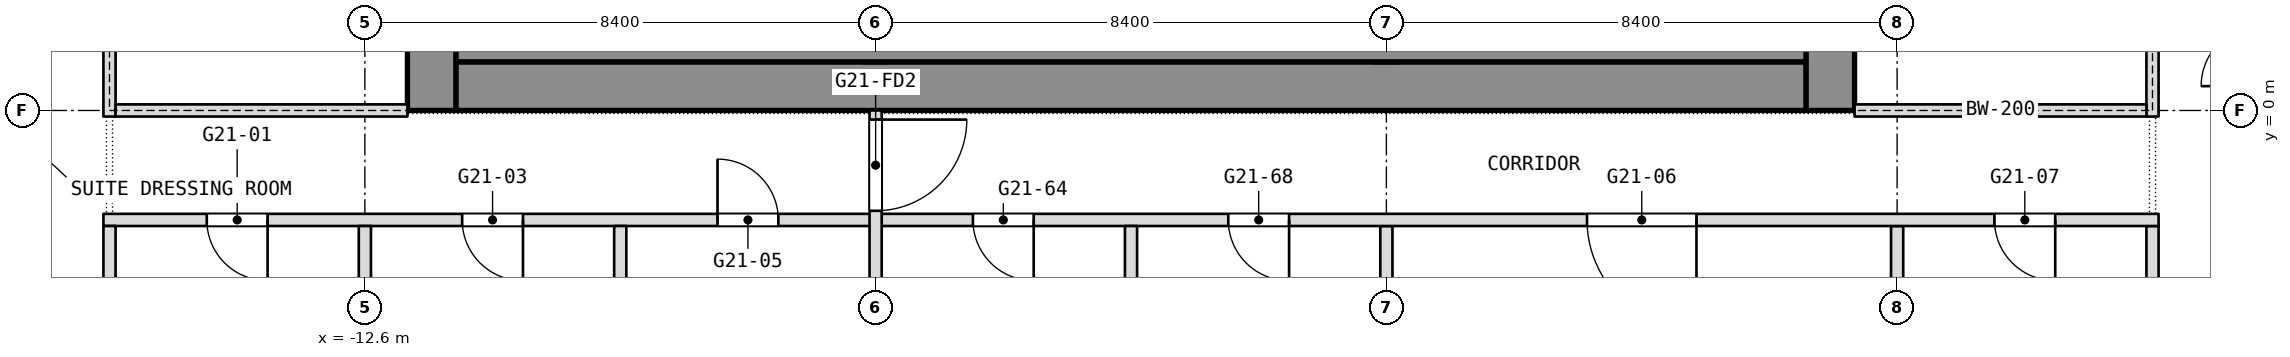
"""IFC4 building model, lengths in metres.
Left out: names, types, materials, properties, quantities, classifications, styles, units other than length and angle.
Written with IfcOpenShell. Run it as: python <this file> out.ifc"""

import sys

from ifc_helpers import new_model, si_unit, direction, frame, frame_2d, origin, place, context, subcontext, project, spatial, rectangle, extrude, element, fill, save


model = new_model("IFC4")
c1 = context("Model", 3, precision=1e-05, world=origin(), true_north=direction((0.0, 1.0)))
c2 = subcontext(c1, "Body", "Model", "MODEL_VIEW")
j1 = project(units=[si_unit("LENGTHUNIT", "METRE"), si_unit("PLANEANGLEUNIT", "RADIAN")], contexts=[c1])
p1 = place(None, origin())
s1 = spatial("IfcSite", under=j1, at=p1, CompositionType="ELEMENT")
p2 = place(p1, origin())
s2 = spatial("IfcBuilding", under=s1, at=p2, CompositionType="ELEMENT")
p3 = place(p2, frame((0.0, 0.0, 248.9)))
s3 = spatial("IfcBuildingStorey", under=s2, at=p3, CompositionType="ELEMENT", Elevation=248.9)
p4 = place(p3, frame((11.5, 0.0, 0.0), z_axis=(0.0, 0.0, 1.0), x_axis=(0.0, 1.0, 0.0)))
e1 = element("IfcWall", 1, at=p4, inside=s3, PredefinedType="SHEAR", context=c2, shape_type="SweptSolid", body=[
    extrude(rectangle(XDim=16.8, YDim=0.8, at=frame_2d((8.4, 0.0))), origin(), (0.0, 0.0, 1.0), 3.6),
])
p5 = place(p4, frame((2.3, 0.0, 0.0)))
e2 = element("IfcOpeningElement", 2, at=p5, cuts=e1, PredefinedType="OPENING", context=c2, shape_type="SweptSolid", body=[
    extrude(rectangle(XDim=1.1, YDim=2.1, at=frame_2d((0.55, 1.05))), frame((0.0, 0.4, 0.0), z_axis=(0.0, -1.0, 0.0), x_axis=(1.0, 0.0, 0.0)), (0.0, 0.0, 1.0), 0.8),
])
p6 = place(p4, frame((4.85, 0.0, 0.0)))
e3 = element("IfcOpeningElement", 3, at=p6, cuts=e1, PredefinedType="OPENING", context=c2, shape_type="SweptSolid", body=[
    extrude(rectangle(XDim=1.1, YDim=2.1, at=frame_2d((0.55, 1.05))), frame((0.0, 0.4, 0.0), z_axis=(0.0, -1.0, 0.0), x_axis=(1.0, 0.0, 0.0)), (0.0, 0.0, 1.0), 0.8),
])
p7 = place(p4, frame((6.825, 0.0, 0.0)))
e4 = element("IfcOpeningElement", 4, at=p7, cuts=e1, PredefinedType="OPENING", context=c2, shape_type="SweptSolid", body=[
    extrude(rectangle(XDim=1.2, YDim=2.1, at=frame_2d((0.6, 1.05))), frame((0.0, 0.4, 0.0), z_axis=(0.0, -1.0, 0.0), x_axis=(1.0, 0.0, 0.0)), (0.0, 0.0, 1.0), 0.8),
])
p8 = place(p4, frame((13.4, 0.0, 0.0)))
e5 = element("IfcOpeningElement", 5, at=p8, cuts=e1, PredefinedType="OPENING", context=c2, shape_type="SweptSolid", body=[
    extrude(rectangle(XDim=1.1, YDim=2.1, at=frame_2d((0.55, 1.05))), frame((0.0, 0.4, 0.0), z_axis=(0.0, -1.0, 0.0), x_axis=(1.0, 0.0, 0.0)), (0.0, 0.0, 1.0), 0.8),
])
p9 = place(p4, frame((10.85, 0.0, 0.0)))
e6 = element("IfcOpeningElement", 6, at=p9, cuts=e1, PredefinedType="OPENING", context=c2, shape_type="SweptSolid", body=[
    extrude(rectangle(XDim=1.1, YDim=2.1, at=frame_2d((0.55, 1.05))), frame((0.0, 0.4, 0.0), z_axis=(0.0, -1.0, 0.0), x_axis=(1.0, 0.0, 0.0)), (0.0, 0.0, 1.0), 0.8),
])
p10 = place(p4, frame((8.775, 0.0, 0.0)))
e7 = element("IfcOpeningElement", 7, at=p10, cuts=e1, PredefinedType="OPENING", context=c2, shape_type="SweptSolid", body=[
    extrude(rectangle(XDim=1.2, YDim=2.1, at=frame_2d((0.6, 1.05))), frame((0.0, 0.4, 0.0), z_axis=(0.0, -1.0, 0.0), x_axis=(1.0, 0.0, 0.0)), (0.0, 0.0, 1.0), 0.8),
])
p11 = place(p3, frame((-11.5, 0.0, 0.0), z_axis=(0.0, 0.0, 1.0), x_axis=(0.0, 1.0, 0.0)))
e8 = element("IfcWall", 8, at=p11, inside=s3, PredefinedType="SHEAR", context=c2, shape_type="SweptSolid", body=[
    extrude(rectangle(XDim=16.8, YDim=0.8, at=frame_2d((8.4, 0.0))), origin(), (0.0, 0.0, 1.0), 3.6),
])
p12 = place(p11, frame((3.6, 0.0, 0.0)))
e9 = element("IfcOpeningElement", 9, at=p12, cuts=e8, PredefinedType="OPENING", context=c2, shape_type="SweptSolid", body=[
    extrude(rectangle(XDim=0.9, YDim=2.1, at=frame_2d((0.45, 1.05))), frame((0.0, 0.4, 0.0), z_axis=(0.0, -1.0, 0.0), x_axis=(1.0, 0.0, 0.0)), (0.0, 0.0, 1.0), 0.8),
])
p13 = place(p11, frame((6.825, 0.0, 0.0)))
e10 = element("IfcOpeningElement", 10, at=p13, cuts=e8, PredefinedType="OPENING", context=c2, shape_type="SweptSolid", body=[
    extrude(rectangle(XDim=1.2, YDim=2.1, at=frame_2d((0.6, 1.05))), frame((0.0, 0.4, 0.0), z_axis=(0.0, -1.0, 0.0), x_axis=(1.0, 0.0, 0.0)), (0.0, 0.0, 1.0), 0.8),
])
p14 = place(p11, frame((14.062, 0.0, 0.0)))
e11 = element("IfcOpeningElement", 11, at=p14, cuts=e8, PredefinedType="OPENING", context=c2, shape_type="SweptSolid", body=[
    extrude(rectangle(XDim=0.9, YDim=2.1, at=frame_2d((0.45, 1.05))), frame((0.0, 0.4, 0.0), z_axis=(0.0, -1.0, 0.0), x_axis=(1.0, 0.0, 0.0)), (0.0, 0.0, 1.0), 0.8),
])
p15 = place(p11, frame((11.438, 0.0, 0.0)))
e12 = element("IfcOpeningElement", 12, at=p15, cuts=e8, PredefinedType="OPENING", context=c2, shape_type="SweptSolid", body=[
    extrude(rectangle(XDim=0.9, YDim=2.1, at=frame_2d((0.45, 1.05))), frame((0.0, 0.4, 0.0), z_axis=(0.0, -1.0, 0.0), x_axis=(1.0, 0.0, 0.0)), (0.0, 0.0, 1.0), 0.8),
])
p16 = place(p11, frame((8.775, 0.0, 0.0)))
e13 = element("IfcOpeningElement", 13, at=p16, cuts=e8, PredefinedType="OPENING", context=c2, shape_type="SweptSolid", body=[
    extrude(rectangle(XDim=1.2, YDim=2.1, at=frame_2d((0.6, 1.05))), frame((0.0, 0.4, 0.0), z_axis=(0.0, -1.0, 0.0), x_axis=(1.0, 0.0, 0.0)), (0.0, 0.0, 1.0), 0.8),
])
p17 = place(p3, frame((-11.1, 0.4, 0.0), z_axis=(0.0, 0.0, 1.0), x_axis=(1.0, 0.0, 0.0)))
e14 = element("IfcWall", 14, at=p17, inside=s3, PredefinedType="SHEAR", context=c2, shape_type="SweptSolid", body=[
    extrude(rectangle(XDim=22.2, YDim=0.8, at=frame_2d((11.1, 0.0))), origin(), (0.0, 0.0, 1.0), 3.6),
])
p18 = place(p3, frame((-4.2, 0.8, 0.0), z_axis=(0.0, 0.0, 1.0), x_axis=(0.0, 1.0, 0.0)))
e15 = element("IfcWall", 15, at=p18, inside=s3, PredefinedType="SHEAR", context=c2, shape_type="SweptSolid", body=[
    extrude(rectangle(XDim=15.2, YDim=0.4, at=frame_2d((7.6, 0.0))), origin(), (0.0, 0.0, 1.0), 3.6),
])
p19 = place(p18, frame((8.5, 0.0, 0.0)))
e16 = element("IfcOpeningElement", 16, at=p19, cuts=e15, PredefinedType="OPENING", context=c2, shape_type="SweptSolid", body=[
    extrude(rectangle(XDim=1.2, YDim=2.1, at=frame_2d((0.6, 1.05))), frame((0.0, 0.2, 0.0), z_axis=(0.0, -1.0, 0.0), x_axis=(1.0, 0.0, 0.0)), (0.0, 0.0, 1.0), 0.4),
])
p20 = place(p3, frame((4.2, 0.8, 0.0), z_axis=(0.0, 0.0, 1.0), x_axis=(0.0, 1.0, 0.0)))
e17 = element("IfcWall", 17, at=p20, inside=s3, PredefinedType="SHEAR", context=c2, shape_type="SweptSolid", body=[
    extrude(rectangle(XDim=15.2, YDim=0.4, at=frame_2d((7.6, 0.0))), origin(), (0.0, 0.0, 1.0), 3.6),
])
p21 = place(p20, frame((5.95, 0.0, 0.0)))
e18 = element("IfcOpeningElement", 18, at=p21, cuts=e17, PredefinedType="OPENING", context=c2, shape_type="SweptSolid", body=[
    extrude(rectangle(XDim=1.2, YDim=2.1, at=frame_2d((0.6, 1.05))), frame((0.0, 0.2, 0.0), z_axis=(0.0, -1.0, 0.0), x_axis=(1.0, 0.0, 0.0)), (0.0, 0.0, 1.0), 0.4),
])
p22 = place(p3, frame((16.8, -7.8, 0.0), z_axis=(0.0, 0.0, 1.0), x_axis=(0.0, 1.0, 0.0)))
e19 = element("IfcWall", 19, at=p22, inside=s3, PredefinedType="PARTITIONING", context=c2, shape_type="SweptSolid", body=[
    extrude(rectangle(XDim=5.9, YDim=0.2, at=frame_2d((2.95, 0.0))), origin(), (0.0, 0.0, 1.0), 3.3),
])
p23 = place(p3, frame((12.6, -7.8, 0.0), z_axis=(0.0, 0.0, 1.0), x_axis=(0.0, 1.0, 0.0)))
e20 = element("IfcWall", 20, at=p23, inside=s3, PredefinedType="PARTITIONING", context=c2, shape_type="SweptSolid", body=[
    extrude(rectangle(XDim=5.9, YDim=0.2, at=frame_2d((2.95, 0.0))), origin(), (0.0, 0.0, 1.0), 2.486),
])
p24 = place(p3, frame((4.2, -11.6, 0.0), z_axis=(0.0, 0.0, 1.0), x_axis=(0.0, 1.0, 0.0)))
e21 = element("IfcWall", 21, at=p24, inside=s3, PredefinedType="PARTITIONING", context=c2, shape_type="SweptSolid", body=[
    extrude(rectangle(XDim=9.7, YDim=0.2, at=frame_2d((4.85, 0.0))), origin(), (0.0, 0.0, 1.0), 2.486),
])
p25 = place(p3, frame((-16.9, -1.8, 0.0), z_axis=(0.0, 0.0, 1.0), x_axis=(1.0, 0.0, 0.0)))
e22 = element("IfcWall", 22, at=p25, inside=s3, PredefinedType="PARTITIONING", context=c2, shape_type="SweptSolid", body=[
    extrude(rectangle(XDim=33.8, YDim=0.2, at=frame_2d((16.9, 0.0))), origin(), (0.0, 0.0, 1.0), 3.3),
])
p26 = place(p25, frame((1.7, 0.0, 0.0)))
e23 = element("IfcOpeningElement", 23, at=p26, cuts=e22, PredefinedType="OPENING", context=c2, shape_type="SweptSolid", body=[
    extrude(rectangle(XDim=1.0, YDim=2.1, at=frame_2d((0.5, 1.05))), frame((0.0, 0.1, 0.0), z_axis=(0.0, -1.0, 0.0), x_axis=(1.0, 0.0, 0.0)), (0.0, 0.0, 1.0), 0.2),
])
p27 = place(p25, frame((5.9, 0.0, 0.0)))
e24 = element("IfcOpeningElement", 24, at=p27, cuts=e22, PredefinedType="OPENING", context=c2, shape_type="SweptSolid", body=[
    extrude(rectangle(XDim=1.0, YDim=2.1, at=frame_2d((0.5, 1.05))), frame((0.0, 0.1, 0.0), z_axis=(0.0, -1.0, 0.0), x_axis=(1.0, 0.0, 0.0)), (0.0, 0.0, 1.0), 0.2),
])
p28 = place(p25, frame((10.1, 0.0, 0.0)))
e25 = element("IfcOpeningElement", 25, at=p28, cuts=e22, PredefinedType="OPENING", context=c2, shape_type="SweptSolid", body=[
    extrude(rectangle(XDim=1.0, YDim=2.1, at=frame_2d((0.5, 1.05))), frame((0.0, 0.1, 0.0), z_axis=(0.0, -1.0, 0.0), x_axis=(1.0, 0.0, 0.0)), (0.0, 0.0, 1.0), 0.2),
])
p29 = place(p25, frame((24.4, 0.0, 0.0)))
e26 = element("IfcOpeningElement", 26, at=p29, cuts=e22, PredefinedType="OPENING", context=c2, shape_type="SweptSolid", body=[
    extrude(rectangle(XDim=1.8, YDim=2.1, at=frame_2d((0.9, 1.05))), frame((0.0, 0.1, 0.0), z_axis=(0.0, -1.0, 0.0), x_axis=(1.0, 0.0, 0.0)), (0.0, 0.0, 1.0), 0.2),
])
p30 = place(p25, frame((31.1, 0.0, 0.0)))
e27 = element("IfcOpeningElement", 27, at=p30, cuts=e22, PredefinedType="OPENING", context=c2, shape_type="SweptSolid", body=[
    extrude(rectangle(XDim=1.0, YDim=2.1, at=frame_2d((0.5, 1.05))), frame((0.0, 0.1, 0.0), z_axis=(0.0, -1.0, 0.0), x_axis=(1.0, 0.0, 0.0)), (0.0, 0.0, 1.0), 0.2),
])
p31 = place(p25, frame((14.3, 0.0, 0.0)))
e28 = element("IfcOpeningElement", 28, at=p31, cuts=e22, PredefinedType="OPENING", context=c2, shape_type="SweptSolid", body=[
    extrude(rectangle(XDim=1.0, YDim=2.1, at=frame_2d((0.5, 1.05))), frame((0.0, 0.1, 0.0), z_axis=(0.0, -1.0, 0.0), x_axis=(1.0, 0.0, 0.0)), (0.0, 0.0, 1.0), 0.2),
])
p32 = place(p25, frame((18.5, 0.0, 0.0)))
e29 = element("IfcOpeningElement", 29, at=p32, cuts=e22, PredefinedType="OPENING", context=c2, shape_type="SweptSolid", body=[
    extrude(rectangle(XDim=1.0, YDim=2.1, at=frame_2d((0.5, 1.05))), frame((0.0, 0.1, 0.0), z_axis=(0.0, -1.0, 0.0), x_axis=(1.0, 0.0, 0.0)), (0.0, 0.0, 1.0), 0.2),
])
p33 = place(p3, frame((0.0, -11.6, 0.0), z_axis=(0.0, 0.0, 1.0), x_axis=(0.0, 1.0, 0.0)))
e30 = element("IfcWall", 30, at=p33, inside=s3, PredefinedType="PARTITIONING", context=c2, shape_type="SweptSolid", body=[
    extrude(rectangle(XDim=9.7, YDim=0.2, at=frame_2d((4.85, 0.0))), origin(), (0.0, 0.0, 1.0), 3.3),
])
p34 = place(p3, frame((-4.2, -13.6, 0.0), z_axis=(0.0, 0.0, 1.0), x_axis=(0.0, 1.0, 0.0)))
e31 = element("IfcWall", 31, at=p34, inside=s3, PredefinedType="PARTITIONING", context=c2, shape_type="SweptSolid", body=[
    extrude(rectangle(XDim=13.6, YDim=0.2, at=frame_2d((6.8, 0.0))), origin(), (0.0, 0.0, 1.0), 2.486),
])
p35 = place(p34, frame((11.95, 0.0, 0.0)))
e32 = element("IfcOpeningElement", 32, at=p35, cuts=e31, PredefinedType="OPENING", context=c2, shape_type="SweptSolid", body=[
    extrude(rectangle(XDim=1.5, YDim=2.1, at=frame_2d((0.75, 1.05))), frame((0.0, 0.1, 0.0), z_axis=(0.0, -1.0, 0.0), x_axis=(1.0, 0.0, 0.0)), (0.0, 0.0, 1.0), 0.2),
])
p36 = place(p34, frame((0.25, 0.0, 0.0)))
e33 = element("IfcOpeningElement", 33, at=p36, cuts=e31, PredefinedType="OPENING", context=c2, shape_type="SweptSolid", body=[
    extrude(rectangle(XDim=1.5, YDim=2.1, at=frame_2d((0.75, 1.05))), frame((0.0, 0.1, 0.0), z_axis=(0.0, -1.0, 0.0), x_axis=(1.0, 0.0, 0.0)), (0.0, 0.0, 1.0), 0.2),
])
p37 = place(p3, frame((-8.4, -8.0, 0.0), z_axis=(0.0, 0.0, 1.0), x_axis=(0.0, 1.0, 0.0)))
e34 = element("IfcWall", 34, at=p37, inside=s3, PredefinedType="PARTITIONING", context=c2, shape_type="SweptSolid", body=[
    extrude(rectangle(XDim=6.1, YDim=0.2, at=frame_2d((3.05, 0.0))), origin(), (0.0, 0.0, 1.0), 3.3),
])
p38 = place(p3, frame((-12.6, -7.8, 0.0), z_axis=(0.0, 0.0, 1.0), x_axis=(0.0, 1.0, 0.0)))
e35 = element("IfcWall", 35, at=p38, inside=s3, PredefinedType="PARTITIONING", context=c2, shape_type="SweptSolid", body=[
    extrude(rectangle(XDim=5.9, YDim=0.2, at=frame_2d((2.95, 0.0))), origin(), (0.0, 0.0, 1.0), 2.486),
])
p39 = place(p3, frame((-16.8, -8.0, 0.0), z_axis=(0.0, 0.0, 1.0), x_axis=(0.0, 1.0, 0.0)))
e36 = element("IfcWall", 36, at=p39, inside=s3, PredefinedType="PARTITIONING", context=c2, shape_type="SweptSolid", body=[
    extrude(rectangle(XDim=6.1, YDim=0.2, at=frame_2d((3.05, 0.0))), origin(), (0.0, 0.0, 1.0), 3.3),
])
p40 = place(p3, frame((-11.1, 1.15, 0.0), z_axis=(0.0, 0.0, 1.0), x_axis=(1.0, 0.0, 0.0)))
e37 = element("IfcWall", 37, at=p40, inside=s3, PredefinedType="PARTITIONING", context=c2, shape_type="SweptSolid", body=[
    extrude(rectangle(XDim=22.2, YDim=0.7, at=frame_2d((11.1, 0.0))), origin(), (0.0, 0.0, 1.0), 3.3),
])
p41 = place(p3, frame((-16.8, -0.1, 0.0), z_axis=(0.0, 0.0, 1.0), x_axis=(0.0, 1.0, 0.0)))
e38 = element("IfcWall", 38, at=p41, inside=s3, PredefinedType="PARTITIONING", context=c2, shape_type="SweptSolid", body=[
    extrude(rectangle(XDim=17.0, YDim=0.2, at=frame_2d((8.5, 0.0))), origin(), (0.0, 0.0, 1.0), 3.3),
])
p42 = place(p41, frame((2.2, 0.0, 0.0)))
e39 = element("IfcOpeningElement", 39, at=p42, cuts=e38, PredefinedType="OPENING", context=c2, shape_type="SweptSolid", body=[
    extrude(rectangle(XDim=1.8, YDim=2.1, at=frame_2d((0.9, 1.05))), frame((0.0, 0.1, 0.0), z_axis=(0.0, -1.0, 0.0), x_axis=(1.0, 0.0, 0.0)), (0.0, 0.0, 1.0), 0.2),
])
p43 = place(p41, frame((13.0, 0.0, 0.0)))
e40 = element("IfcOpeningElement", 40, at=p43, cuts=e38, PredefinedType="OPENING", context=c2, shape_type="SweptSolid", body=[
    extrude(rectangle(XDim=1.8, YDim=2.1, at=frame_2d((0.9, 1.05))), frame((0.0, 0.1, 0.0), z_axis=(0.0, -1.0, 0.0), x_axis=(1.0, 0.0, 0.0)), (0.0, 0.0, 1.0), 0.2),
])
p44 = place(p3, frame((-16.7, 0.0, 0.0), z_axis=(0.0, 0.0, 1.0), x_axis=(1.0, 0.0, 0.0)))
e41 = element("IfcWall", 41, at=p44, inside=s3, PredefinedType="PARTITIONING", context=c2, shape_type="SweptSolid", body=[
    extrude(rectangle(XDim=4.8, YDim=0.2, at=frame_2d((2.4, 0.0))), origin(), (0.0, 0.0, 1.0), 2.9),
])
p45 = place(p3, frame((16.8, -0.1, 0.0), z_axis=(0.0, 0.0, 1.0), x_axis=(0.0, 1.0, 0.0)))
e42 = element("IfcWall", 42, at=p45, inside=s3, PredefinedType="PARTITIONING", context=c2, shape_type="SweptSolid", body=[
    extrude(rectangle(XDim=17.0, YDim=0.2, at=frame_2d((8.5, 0.0))), origin(), (0.0, 0.0, 1.0), 3.3),
])
p46 = place(p45, frame((2.2, 0.0, 0.0)))
e43 = element("IfcOpeningElement", 43, at=p46, cuts=e42, PredefinedType="OPENING", context=c2, shape_type="SweptSolid", body=[
    extrude(rectangle(XDim=1.8, YDim=2.1, at=frame_2d((0.9, 1.05))), frame((0.0, 0.1, 0.0), z_axis=(0.0, -1.0, 0.0), x_axis=(1.0, 0.0, 0.0)), (0.0, 0.0, 1.0), 0.2),
])
p47 = place(p45, frame((13.0, 0.0, 0.0)))
e44 = element("IfcOpeningElement", 44, at=p47, cuts=e42, PredefinedType="OPENING", context=c2, shape_type="SweptSolid", body=[
    extrude(rectangle(XDim=1.8, YDim=2.1, at=frame_2d((0.9, 1.05))), frame((0.0, 0.1, 0.0), z_axis=(0.0, -1.0, 0.0), x_axis=(1.0, 0.0, 0.0)), (0.0, 0.0, 1.0), 0.2),
])
p48 = place(p3, frame((11.9, 0.0, 0.0), z_axis=(0.0, 0.0, 1.0), x_axis=(1.0, 0.0, 0.0)))
e45 = element("IfcWall", 45, at=p48, inside=s3, PredefinedType="PARTITIONING", context=c2, shape_type="SweptSolid", body=[
    extrude(rectangle(XDim=4.8, YDim=0.2, at=frame_2d((2.4, 0.0))), origin(), (0.0, 0.0, 1.0), 2.9),
])
p49 = place(p26, origin())
e46 = element("IfcDoor", 46, at=p49, inside=s3, OperationType="SINGLE_SWING_LEFT", PredefinedType="DOOR", context=c2, shape_type="SweptSolid", body=[
    extrude(rectangle(XDim=1.0, YDim=2.1, at=frame_2d((0.5, 1.05))), frame((0.0, 0.025, 0.0), z_axis=(0.0, -1.0, 0.0), x_axis=(1.0, 0.0, 0.0)), (0.0, 0.0, 1.0), 0.05),
])
fill(e23, e46)
p50 = place(p27, origin())
e47 = element("IfcDoor", 47, at=p50, inside=s3, OperationType="SINGLE_SWING_LEFT", PredefinedType="DOOR", context=c2, shape_type="SweptSolid", body=[
    extrude(rectangle(XDim=1.0, YDim=2.1, at=frame_2d((0.5, 1.05))), frame((0.0, 0.025, 0.0), z_axis=(0.0, -1.0, 0.0), x_axis=(1.0, 0.0, 0.0)), (0.0, 0.0, 1.0), 0.05),
])
fill(e24, e47)
p51 = place(p28, origin())
e48 = element("IfcDoor", 48, at=p51, inside=s3, OperationType="SINGLE_SWING_RIGHT", PredefinedType="DOOR", context=c2, shape_type="SweptSolid", body=[
    extrude(rectangle(XDim=1.0, YDim=2.1, at=frame_2d((0.5, 1.05))), frame((0.0, 0.025, 0.0), z_axis=(0.0, -1.0, 0.0), x_axis=(1.0, 0.0, 0.0)), (0.0, 0.0, 1.0), 0.05),
])
fill(e25, e48)
p52 = place(p29, origin())
e49 = element("IfcDoor", 49, at=p52, inside=s3, OperationType="DOUBLE_DOOR_SINGLE_SWING", PredefinedType="DOOR", context=c2, shape_type="SweptSolid", body=[
    extrude(rectangle(XDim=1.8, YDim=2.1, at=frame_2d((0.9, 1.05))), frame((0.0, 0.025, 0.0), z_axis=(0.0, -1.0, 0.0), x_axis=(1.0, 0.0, 0.0)), (0.0, 0.0, 1.0), 0.05),
])
fill(e26, e49)
p53 = place(p30, origin())
e50 = element("IfcDoor", 50, at=p53, inside=s3, OperationType="SINGLE_SWING_RIGHT", PredefinedType="DOOR", context=c2, shape_type="SweptSolid", body=[
    extrude(rectangle(XDim=1.0, YDim=2.1, at=frame_2d((0.5, 1.05))), frame((0.0, 0.025, 0.0), z_axis=(0.0, -1.0, 0.0), x_axis=(1.0, 0.0, 0.0)), (0.0, 0.0, 1.0), 0.05),
])
fill(e27, e50)
p54 = place(p31, origin())
e51 = element("IfcDoor", 51, at=p54, inside=s3, OperationType="SINGLE_SWING_LEFT", PredefinedType="DOOR", context=c2, shape_type="SweptSolid", body=[
    extrude(rectangle(XDim=1.0, YDim=2.1, at=frame_2d((0.5, 1.05))), frame((0.0, 0.025, 0.0), z_axis=(0.0, -1.0, 0.0), x_axis=(1.0, 0.0, 0.0)), (0.0, 0.0, 1.0), 0.05),
])
fill(e28, e51)
p55 = place(p32, origin())
e52 = element("IfcDoor", 52, at=p55, inside=s3, OperationType="SINGLE_SWING_LEFT", PredefinedType="DOOR", context=c2, shape_type="SweptSolid", body=[
    extrude(rectangle(XDim=1.0, YDim=2.1, at=frame_2d((0.5, 1.05))), frame((0.0, 0.025, 0.0), z_axis=(0.0, -1.0, 0.0), x_axis=(1.0, 0.0, 0.0)), (0.0, 0.0, 1.0), 0.05),
])
fill(e29, e52)
p56 = place(p35, origin())
e53 = element("IfcDoor", 53, at=p56, inside=s3, OperationType="DOUBLE_DOOR_DOUBLE_SWING", PredefinedType="DOOR", context=c2, shape_type="SweptSolid", body=[
    extrude(rectangle(XDim=1.5, YDim=2.1, at=frame_2d((0.75, 1.05))), frame((0.0, 0.025, 0.0), z_axis=(0.0, -1.0, 0.0), x_axis=(1.0, 0.0, 0.0)), (0.0, 0.0, 1.0), 0.05),
])
fill(e32, e53)
save(model, sys.argv[1])
